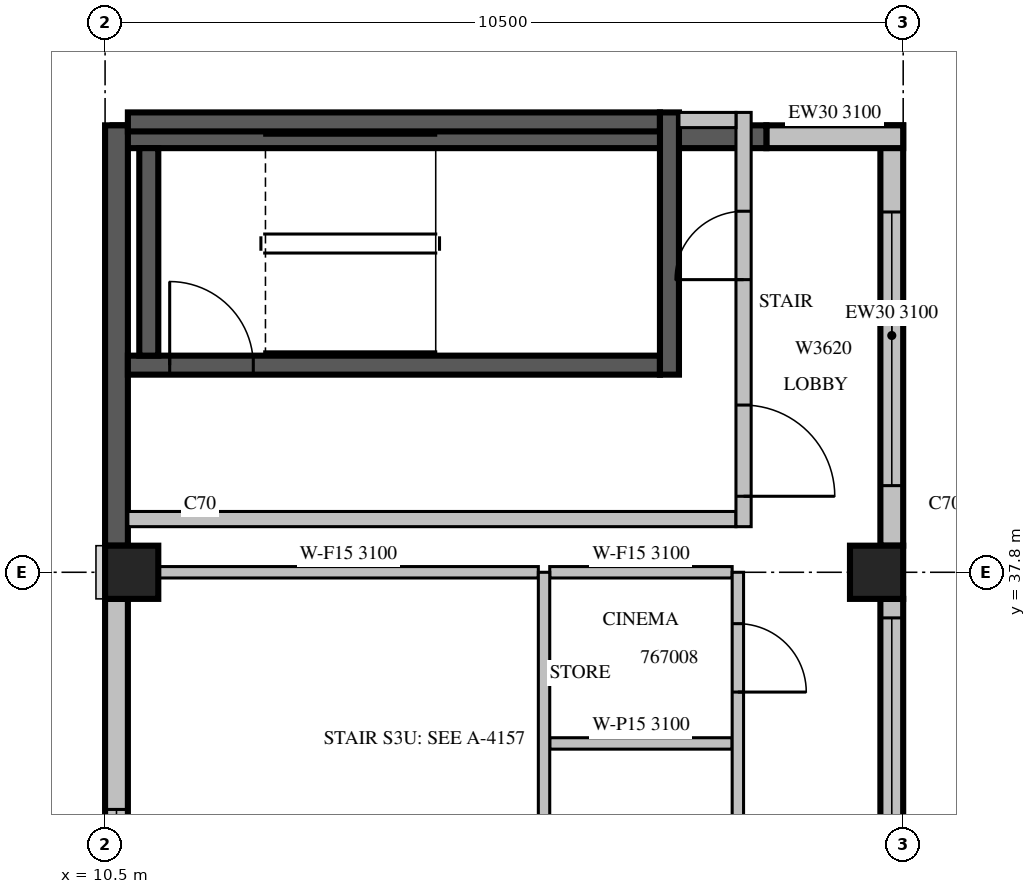
"""IFC4 building model, lengths in metres.
Left out: names, types, materials, properties, quantities, classifications, styles, units other than length and angle.
Written with IfcOpenShell. Run it as: python <this file> out.ifc"""

import sys

from ifc_helpers import new_model, si_unit, direction, frame, frame_2d, origin, origin_2d, place, context, subcontext, project, spatial, rectangle, extrude, source, transform, mapped, element, fill, save


model = new_model("IFC4")
c1 = context("Model", 3, precision=1e-05, world=origin(), true_north=direction((0.0, 1.0)))
c2 = subcontext(c1, "Body", "Model", "MODEL_VIEW")
j1 = project(units=[si_unit("LENGTHUNIT", "METRE"), si_unit("PLANEANGLEUNIT", "RADIAN")], contexts=[c1])
p1 = place(None, origin())
s1 = spatial("IfcSite", under=j1, at=p1, CompositionType="ELEMENT")
p2 = place(p1, origin())
s2 = spatial("IfcBuilding", under=s1, at=p2, CompositionType="ELEMENT")
p3 = place(p2, frame((0.0, 0.0, 295.0)))
s3 = spatial("IfcBuildingStorey", under=s2, at=p3, CompositionType="ELEMENT", Elevation=295.0)
m1 = source(origin(), c2, "Body", "SweptSolid", [
    extrude(rectangle(XDim=0.7, YDim=0.7, at=origin_2d()), origin(), (0.0, 0.0, 1.0), 3.5),
])
for number, where, z_axis, x_axis in (
    (1, (10.85, 37.8, 0.0), (0.0, 0.0, 1.0), (1.0, 0.0, 0.0)),
    (2, (20.65, 37.8, 0.0), (0.0, 0.0, 1.0), (1.0, 0.0, 0.0)),
):
    element("IfcColumn", number, at=place(p3, frame(where, z_axis=z_axis, x_axis=x_axis)), inside=s3, PredefinedType="COLUMN", context=c2, shape_type="MappedRepresentation", body=[
        mapped(m1, transform((0.0, 0.0, 0.0), scale=1.0)),
    ])
m2 = source(origin(), c2, "Body", "SweptSolid", [
    extrude(rectangle(XDim=7.7, YDim=0.3, at=frame_2d((3.85, 0.0))), origin(), (0.0, 0.0, 1.0), 2.6),
])
p4 = place(p3, frame((20.85, 29.75, 0.0), z_axis=(0.0, 0.0, 1.0), x_axis=(0.0, 1.0, 0.0)))
e3 = element("IfcWall", 3, at=p4, inside=s3, PredefinedType="STANDARD", context=c2, shape_type="MappedRepresentation", body=[
    mapped(m2, transform((0.0, 0.0, 0.0), scale=1.0)),
])
m3 = source(origin(), c2, "Body", "SweptSolid", [
    extrude(rectangle(XDim=3.0, YDim=2.0, at=frame_2d((1.5, 1.0))), frame((0.0, 0.16, 0.0), z_axis=(0.0, -1.0, 0.0), x_axis=(1.0, 0.0, 0.0)), (0.0, 0.0, 1.0), 0.32),
])
p5 = place(p4, frame((0.25, 0.0, 0.6)))
e4 = element("IfcOpeningElement", 4, at=p5, cuts=e3, PredefinedType="OPENING", context=c2, shape_type="MappedRepresentation", body=[
    mapped(m3, transform((0.0, 0.0, 0.0), scale=1.0)),
])
p6 = place(p4, frame((4.45, 0.0, 0.6)))
e5 = element("IfcOpeningElement", 5, at=p6, cuts=e3, PredefinedType="OPENING", context=c2, shape_type="MappedRepresentation", body=[
    mapped(m3, transform((0.0, 0.0, 0.0), scale=1.0)),
])
m4 = source(origin(), c2, "Body", "SweptSolid", [
    extrude(rectangle(XDim=5.53, YDim=0.3, at=frame_2d((2.765, 0.0))), origin(), (0.0, 0.0, 1.0), 3.1),
])
p7 = place(p3, frame((20.85, 38.15, 0.0), z_axis=(0.0, 0.0, 1.0), x_axis=(0.0, 1.0, 0.0)))
e6 = element("IfcWall", 6, at=p7, inside=s3, PredefinedType="STANDARD", context=c2, shape_type="MappedRepresentation", body=[
    mapped(m4, transform((0.0, 0.0, 0.0), scale=1.0)),
])
m5 = source(origin(), c2, "Body", "SweptSolid", [
    extrude(rectangle(XDim=3.6, YDim=2.0, at=frame_2d((1.8, 1.0))), frame((0.0, 0.16, 0.0), z_axis=(0.0, -1.0, 0.0), x_axis=(1.0, 0.0, 0.0)), (0.0, 0.0, 1.0), 0.32),
])
p8 = place(p7, frame((0.79, 0.0, 0.6)))
e7 = element("IfcOpeningElement", 7, at=p8, cuts=e6, PredefinedType="OPENING", context=c2, shape_type="MappedRepresentation", body=[
    mapped(m5, transform((0.0, 0.0, 0.0), scale=1.0)),
])
m6 = source(origin(), c2, "Body", "SweptSolid", [
    extrude(rectangle(XDim=1.8, YDim=0.3, at=frame_2d((0.9, 0.0))), origin(), (0.0, 0.0, 1.0), 3.1),
])
p9 = place(p3, frame((21.0, 43.53, 0.0), z_axis=(0.0, 0.0, 1.0), x_axis=(-1.0, 0.0, 0.0)))
e8 = element("IfcWall", 8, at=p9, inside=s3, PredefinedType="STANDARD", context=c2, shape_type="MappedRepresentation", body=[
    mapped(m6, transform((0.0, 0.0, 0.0), scale=1.0)),
])
m7 = source(origin(), c2, "Body", "SweptSolid", [
    extrude(rectangle(XDim=8.6, YDim=0.3, at=frame_2d((4.3, 0.0))), origin(), (0.0, 0.0, 1.0), 3.1),
])
p10 = place(p3, frame((19.2, 43.53, 0.0), z_axis=(0.0, 0.0, 1.0), x_axis=(-1.0, 0.0, 0.0)))
e9 = element("IfcWall", 9, at=p10, inside=s3, PredefinedType="SOLIDWALL", context=c2, shape_type="MappedRepresentation", body=[
    mapped(m7, transform((0.0, 0.0, 0.0), scale=1.0)),
])
m8 = source(origin(), c2, "Body", "SweptSolid", [
    extrude(rectangle(XDim=5.53, YDim=0.3, at=frame_2d((2.765, 0.0))), origin(), (0.0, 0.0, 1.0), 3.1),
])
p11 = place(p3, frame((10.65, 43.68, 0.0), z_axis=(0.0, 0.0, 1.0), x_axis=(0.0, -1.0, 0.0)))
e10 = element("IfcWall", 10, at=p11, inside=s3, PredefinedType="SOLIDWALL", context=c2, shape_type="MappedRepresentation", body=[
    mapped(m8, transform((0.0, 0.0, 0.0), scale=1.0)),
])
m9 = source(origin(), c2, "Body", "SweptSolid", [
    extrude(rectangle(XDim=6.37, YDim=0.3, at=frame_2d((3.185, 0.0))), origin(), (0.0, 0.0, 1.0), 3.1),
])
p12 = place(p3, frame((10.65, 37.45, 0.0), z_axis=(0.0, 0.0, 1.0), x_axis=(0.0, -1.0, 0.0)))
e11 = element("IfcWall", 11, at=p12, inside=s3, PredefinedType="STANDARD", context=c2, shape_type="MappedRepresentation", body=[
    mapped(m9, transform((0.0, 0.0, 0.0), scale=1.0)),
])
p13 = place(p12, frame((2.77, 0.0, 0.6)))
e12 = element("IfcOpeningElement", 12, at=p13, cuts=e11, PredefinedType="OPENING", context=c2, shape_type="MappedRepresentation", body=[
    mapped(m3, transform((0.0, 0.0, 0.0), scale=1.0)),
])
m10 = source(origin(), c2, "Body", "SweptSolid", [
    extrude(rectangle(XDim=7.0, YDim=0.25, at=frame_2d((3.5, 0.0))), origin(), (0.0, 0.0, 1.0), 3.1),
])
p14 = place(p3, frame((10.8, 40.525, 0.0), z_axis=(0.0, 0.0, 1.0), x_axis=(1.0, 0.0, 0.0)))
e13 = element("IfcWall", 13, at=p14, inside=s3, PredefinedType="SOLIDWALL", context=c2, shape_type="MappedRepresentation", body=[
    mapped(m10, transform((0.0, 0.0, 0.0), scale=1.0)),
])
m11 = source(origin(), c2, "Body", "SweptSolid", [
    extrude(rectangle(XDim=1.1, YDim=2.1, at=frame_2d((0.55, 1.05))), frame((0.0, 0.135, 0.0), z_axis=(0.0, -1.0, 0.0), x_axis=(1.0, 0.0, 0.0)), (0.0, 0.0, 1.0), 0.27),
])
p15 = place(p14, frame((0.55, 0.0, 0.0)))
e14 = element("IfcOpeningElement", 14, at=p15, cuts=e13, PredefinedType="OPENING", context=c2, shape_type="MappedRepresentation", body=[
    mapped(m11, transform((0.0, 0.0, 0.0), scale=1.0)),
])
p16 = place(p3, frame((10.8, 43.725, 0.0), z_axis=(0.0, 0.0, 1.0), x_axis=(1.0, 0.0, 0.0)))
e15 = element("IfcWall", 15, at=p16, inside=s3, PredefinedType="SOLIDWALL", context=c2, shape_type="MappedRepresentation", body=[
    mapped(m10, transform((0.0, 0.0, 0.0), scale=1.0)),
])
m12 = source(origin(), c2, "Body", "SweptSolid", [
    extrude(rectangle(XDim=3.45, YDim=0.25, at=frame_2d((1.725, 0.0))), origin(), (0.0, 0.0, 1.0), 3.1),
])
p17 = place(p3, frame((17.925, 40.4, 0.0), z_axis=(0.0, 0.0, 1.0), x_axis=(0.0, 1.0, 0.0)))
e16 = element("IfcWall", 16, at=p17, inside=s3, PredefinedType="SOLIDWALL", context=c2, shape_type="MappedRepresentation", body=[
    mapped(m12, transform((0.0, 0.0, 0.0), scale=1.0)),
])
m13 = source(origin(), c2, "Body", "SweptSolid", [
    extrude(rectangle(XDim=2.73, YDim=0.25, at=frame_2d((1.365, 0.0))), origin(), (0.0, 0.0, 1.0), 3.1),
])
p18 = place(p3, frame((11.075, 40.65, 0.0), z_axis=(0.0, 0.0, 1.0), x_axis=(0.0, 1.0, 0.0)))
e17 = element("IfcWall", 17, at=p18, inside=s3, PredefinedType="SOLIDWALL", context=c2, shape_type="MappedRepresentation", body=[
    mapped(m13, transform((0.0, 0.0, 0.0), scale=1.0)),
])
m14 = source(origin(), c2, "Body", "SweptSolid", [
    extrude(rectangle(XDim=8.0, YDim=0.2, at=frame_2d((4.0, 0.0))), origin(), (0.0, 0.0, 1.0), 3.1),
])
p19 = place(p3, frame((10.8, 38.5, 0.0), z_axis=(0.0, 0.0, 1.0), x_axis=(1.0, 0.0, 0.0)))
e18 = element("IfcWall", 18, at=p19, inside=s3, PredefinedType="PARTITIONING", context=c2, shape_type="MappedRepresentation", body=[
    mapped(m14, transform((0.0, 0.0, 0.0), scale=1.0)),
])
m15 = source(origin(), c2, "Body", "SweptSolid", [
    extrude(rectangle(XDim=5.45, YDim=0.2, at=frame_2d((2.725, 0.0))), origin(), (0.0, 0.0, 1.0), 3.1),
])
p20 = place(p3, frame((18.9, 38.4, 0.0), z_axis=(0.0, 0.0, 1.0), x_axis=(0.0, 1.0, 0.0)))
e19 = element("IfcWall", 19, at=p20, inside=s3, PredefinedType="PARTITIONING", context=c2, shape_type="MappedRepresentation", body=[
    mapped(m15, transform((0.0, 0.0, 0.0), scale=1.0)),
])
m16 = source(origin(), c2, "Body", "SweptSolid", [
    extrude(rectangle(XDim=1.2, YDim=2.1, at=frame_2d((0.6, 1.05))), frame((0.0, 0.11, 0.0), z_axis=(0.0, -1.0, 0.0), x_axis=(1.0, 0.0, 0.0)), (0.0, 0.0, 1.0), 0.22),
])
p21 = place(p20, frame((0.4, 0.0, 0.0)))
e20 = element("IfcOpeningElement", 20, at=p21, cuts=e19, PredefinedType="OPENING", context=c2, shape_type="MappedRepresentation", body=[
    mapped(m16, transform((0.0, 0.0, 0.0), scale=1.0)),
])
m17 = source(origin(), c2, "Body", "SweptSolid", [
    extrude(rectangle(XDim=0.9, YDim=2.1, at=frame_2d((0.45, 1.05))), frame((0.0, 0.11, 0.0), z_axis=(0.0, -1.0, 0.0), x_axis=(1.0, 0.0, 0.0)), (0.0, 0.0, 1.0), 0.22),
])
p22 = place(p20, frame((3.25, 0.0, 0.0)))
e21 = element("IfcOpeningElement", 21, at=p22, cuts=e19, PredefinedType="OPENING", context=c2, shape_type="MappedRepresentation", body=[
    mapped(m17, transform((0.0, 0.0, 0.0), scale=1.0)),
])
m18 = source(origin(), c2, "Body", "SweptSolid", [
    extrude(rectangle(XDim=0.75, YDim=0.2, at=frame_2d((0.375, 0.0))), origin(), (0.0, 0.0, 1.0), 3.1),
])
p23 = place(p3, frame((18.05, 43.75, 0.0), z_axis=(0.0, 0.0, 1.0), x_axis=(1.0, 0.0, 0.0)))
e22 = element("IfcWall", 22, at=p23, inside=s3, PredefinedType="PARTITIONING", context=c2, shape_type="MappedRepresentation", body=[
    mapped(m18, transform((0.0, 0.0, 0.0), scale=1.0)),
])
p24 = place(p3, frame((18.75, 35.548, 0.0), z_axis=(0.0, 0.0, 1.0), x_axis=(-1.0, 0.0, 0.0)))
e23 = element("IfcWall", 23, at=p24, inside=s3, PredefinedType="PARTITIONING", context=c2, shape_type="SweptSolid", body=[
    extrude(rectangle(XDim=2.4, YDim=0.15, at=frame_2d((1.2, 0.0))), origin(), (0.0, 0.0, 1.0), 3.1),
])
m19 = source(origin(), c2, "Body", "SweptSolid", [
    extrude(rectangle(XDim=5.001, YDim=0.15, at=frame_2d((2.501, 0.0))), origin(), (0.0, 0.0, 1.0), 3.1),
])
p25 = place(p3, frame((16.2, 37.8, 0.0), z_axis=(0.0, 0.0, 1.0), x_axis=(-1.0, 0.0, 0.0)))
e24 = element("IfcWall", 24, at=p25, inside=s3, PredefinedType="PARTITIONING", context=c2, shape_type="MappedRepresentation", body=[
    mapped(m19, transform((0.0, 0.0, 0.0), scale=1.0)),
])
m20 = source(origin(), c2, "Body", "SweptSolid", [
    extrude(rectangle(XDim=2.4, YDim=0.15, at=frame_2d((1.2, 0.0))), origin(), (0.0, 0.0, 1.0), 3.1),
])
p26 = place(p3, frame((18.75, 37.8, 0.0), z_axis=(0.0, 0.0, 1.0), x_axis=(-1.0, 0.0, 0.0)))
e25 = element("IfcWall", 25, at=p26, inside=s3, PredefinedType="PARTITIONING", context=c2, shape_type="MappedRepresentation", body=[
    mapped(m20, transform((0.0, 0.0, 0.0), scale=1.0)),
])
m21 = source(origin(), c2, "Body", "SweptSolid", [
    extrude(rectangle(XDim=8.4, YDim=0.15, at=frame_2d((4.2, 0.0))), origin(), (0.0, 0.0, 1.0), 2.6),
])
p27 = place(p3, frame((16.275, 29.4, 0.0), z_axis=(0.0, 0.0, 1.0), x_axis=(0.0, 1.0, 0.0)))
e26 = element("IfcWall", 26, at=p27, inside=s3, PredefinedType="PARTITIONING", context=c2, shape_type="MappedRepresentation", body=[
    mapped(m21, transform((0.0, 0.0, 0.0), scale=1.0)),
])
m22 = source(origin(), c2, "Body", "SweptSolid", [
    extrude(rectangle(XDim=1.2, YDim=2.1, at=frame_2d((0.6, 1.05))), frame((0.0, 0.085, 0.0), z_axis=(0.0, -1.0, 0.0), x_axis=(1.0, 0.0, 0.0)), (0.0, 0.0, 1.0), 0.17),
])
p28 = place(p27, frame((2.524, 0.0, 0.0)))
e27 = element("IfcOpeningElement", 27, at=p28, cuts=e26, PredefinedType="OPENING", context=c2, shape_type="MappedRepresentation", body=[
    mapped(m22, transform((0.0, 0.0, 0.0), scale=1.0)),
])
p29 = place(p3, frame((18.825, 29.4, 0.0), z_axis=(0.0, 0.0, 1.0), x_axis=(0.0, 1.0, 0.0)))
e28 = element("IfcWall", 28, at=p29, inside=s3, PredefinedType="PARTITIONING", context=c2, shape_type="MappedRepresentation", body=[
    mapped(m21, transform((0.0, 0.0, 0.0), scale=1.0)),
])
p30 = place(p29, frame((2.474, 0.0, 0.0)))
e29 = element("IfcOpeningElement", 29, at=p30, cuts=e28, PredefinedType="OPENING", context=c2, shape_type="MappedRepresentation", body=[
    mapped(m22, transform((0.0, 0.0, 0.0), scale=1.0)),
])
m23 = source(origin(), c2, "Body", "SweptSolid", [
    extrude(rectangle(XDim=0.9, YDim=2.1, at=frame_2d((0.45, 1.05))), frame((0.0, 0.085, 0.0), z_axis=(0.0, -1.0, 0.0), x_axis=(1.0, 0.0, 0.0)), (0.0, 0.0, 1.0), 0.17),
])
p31 = place(p29, frame((6.824, 0.0, 0.0)))
e30 = element("IfcOpeningElement", 30, at=p31, cuts=e28, PredefinedType="OPENING", context=c2, shape_type="MappedRepresentation", body=[
    mapped(m23, transform((0.0, 0.0, 0.0), scale=1.0)),
])
m24 = source(origin(), c2, "Body", "SweptSolid", [
    extrude(rectangle(XDim=3.0, YDim=2.0, at=frame_2d((1.5, 1.0))), frame((0.0, 0.03, 0.0), z_axis=(0.0, -1.0, 0.0), x_axis=(1.0, 0.0, 0.0)), (0.0, 0.0, 1.0), 0.06),
])
p32 = place(p6, origin())
e31 = element("IfcWindow", 31, at=p32, inside=s3, PartitioningType="SINGLE_PANEL", PredefinedType="WINDOW", context=c2, shape_type="MappedRepresentation", body=[
    mapped(m24, transform((0.0, 0.0, 0.0), scale=1.0)),
])
fill(e5, e31)
m25 = source(origin(), c2, "Body", "SweptSolid", [
    extrude(rectangle(XDim=3.6, YDim=2.0, at=frame_2d((1.8, 1.0))), frame((0.0, 0.03, 0.0), z_axis=(0.0, -1.0, 0.0), x_axis=(1.0, 0.0, 0.0)), (0.0, 0.0, 1.0), 0.06),
])
p33 = place(p8, origin())
e32 = element("IfcWindow", 32, at=p33, inside=s3, PartitioningType="SINGLE_PANEL", PredefinedType="WINDOW", context=c2, shape_type="MappedRepresentation", body=[
    mapped(m25, transform((0.0, 0.0, 0.0), scale=1.0)),
])
fill(e7, e32)
p34 = place(p13, origin())
e33 = element("IfcWindow", 33, at=p34, inside=s3, PartitioningType="SINGLE_PANEL", PredefinedType="WINDOW", context=c2, shape_type="MappedRepresentation", body=[
    mapped(m24, transform((0.0, 0.0, 0.0), scale=1.0)),
])
fill(e12, e33)
m26 = source(origin(), c2, "Body", "SweptSolid", [
    extrude(rectangle(XDim=1.1, YDim=2.1, at=frame_2d((0.55, 1.05))), frame((0.0, 0.025, 0.0), z_axis=(0.0, -1.0, 0.0), x_axis=(1.0, 0.0, 0.0)), (0.0, 0.0, 1.0), 0.05),
])
p35 = place(p15, origin())
e34 = element("IfcDoor", 34, at=p35, inside=s3, OperationType="SINGLE_SWING_LEFT", PredefinedType="DOOR", context=c2, shape_type="MappedRepresentation", body=[
    mapped(m26, transform((0.0, 0.0, 0.0), scale=1.0)),
])
fill(e14, e34)
m27 = source(origin(), c2, "Body", "SweptSolid", [
    extrude(rectangle(XDim=1.2, YDim=2.1, at=frame_2d((0.6, 1.05))), frame((0.0, 0.025, 0.0), z_axis=(0.0, -1.0, 0.0), x_axis=(1.0, 0.0, 0.0)), (0.0, 0.0, 1.0), 0.05),
])
p36 = place(p21, origin())
e35 = element("IfcDoor", 35, at=p36, inside=s3, OperationType="SINGLE_SWING_RIGHT", PredefinedType="DOOR", context=c2, shape_type="MappedRepresentation", body=[
    mapped(m27, transform((0.0, 0.0, 0.0), scale=1.0)),
])
fill(e20, e35)
m28 = source(origin(), c2, "Body", "SweptSolid", [
    extrude(rectangle(XDim=0.9, YDim=2.1, at=frame_2d((0.45, 1.05))), frame((0.0, 0.025, 0.0), z_axis=(0.0, -1.0, 0.0), x_axis=(1.0, 0.0, 0.0)), (0.0, 0.0, 1.0), 0.05),
])
p37 = place(p22, origin())
e36 = element("IfcDoor", 36, at=p37, inside=s3, OperationType="SINGLE_SWING_LEFT", PredefinedType="DOOR", context=c2, shape_type="MappedRepresentation", body=[
    mapped(m28, transform((0.0, 0.0, 0.0), scale=1.0)),
])
fill(e21, e36)
p38 = place(p31, origin())
e37 = element("IfcDoor", 37, at=p38, inside=s3, OperationType="SINGLE_SWING_RIGHT", PredefinedType="DOOR", context=c2, shape_type="MappedRepresentation", body=[
    mapped(m28, transform((0.0, 0.0, 0.0), scale=1.0)),
])
fill(e30, e37)
save(model, sys.argv[1])
